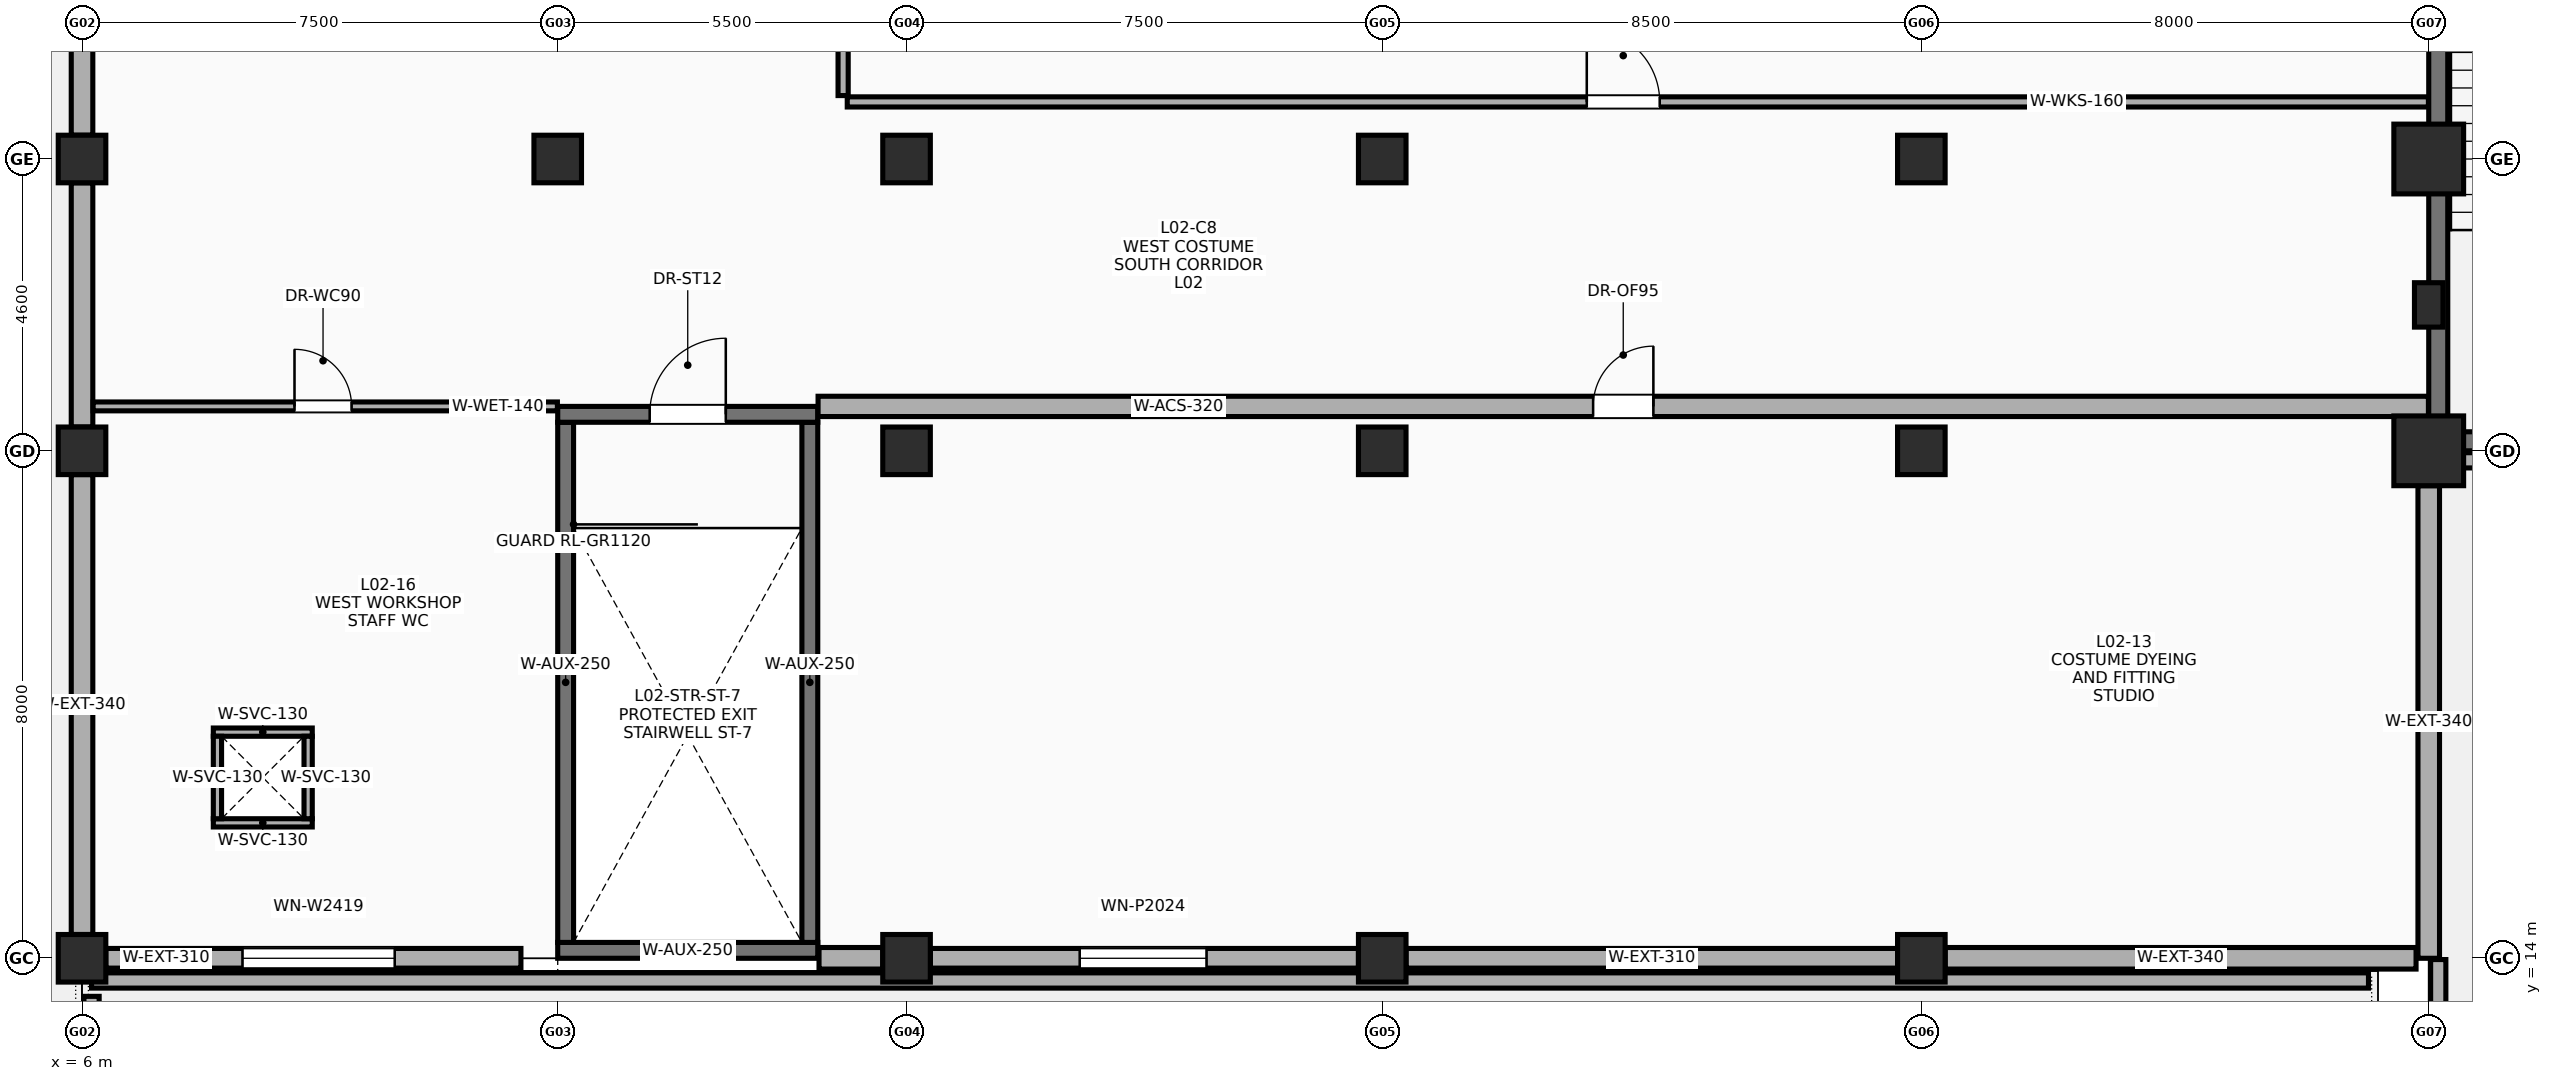
"""IFC4 building model, lengths in metres.
Left out: names, types, materials, properties, quantities, classifications, styles, units other than length and angle.
Written with IfcOpenShell. Run it as: python <this file> out.ifc"""

import sys

from ifc_helpers import new_model, si_unit, direction, frame, frame_2d, origin, origin_2d, place, context, subcontext, project, spatial, rectangle, extrude, element, fill, save


model = new_model("IFC4")
c1 = context("Model", 3, precision=1e-05, world=origin(), true_north=direction((0.0, 1.0)))
c2 = subcontext(c1, "Body", "Model", "MODEL_VIEW")
j1 = project(units=[si_unit("LENGTHUNIT", "METRE"), si_unit("PLANEANGLEUNIT", "RADIAN")], contexts=[c1])
p1 = place(None, origin())
s1 = spatial("IfcSite", under=j1, at=p1, CompositionType="ELEMENT")
p2 = place(p1, origin())
s2 = spatial("IfcBuilding", under=s1, at=p2, CompositionType="ELEMENT")
p3 = place(p2, frame((0.0, 0.0, 9.8)))
s3 = spatial("IfcBuildingStorey", under=s2, at=p3, CompositionType="ELEMENT", Elevation=9.8)
for number, where, z_axis, x_axis in (
    (1, (6.0, 14.0, 0.0), (0.0, 0.0, 1.0), (1.0, 0.0, 0.0)),
    (2, (6.0, 22.0, 0.0), (0.0, 0.0, 1.0), (1.0, 0.0, 0.0)),
    (3, (6.0, 26.6, 0.0), (0.0, 0.0, 1.0), (1.0, 0.0, 0.0)),
    (4, (13.5, 26.6, 0.0), (0.0, 0.0, 1.0), (1.0, 0.0, 0.0)),
    (5, (19.0, 14.0, 0.0), (0.0, 0.0, 1.0), (1.0, 0.0, 0.0)),
    (6, (19.0, 22.0, 0.0), (0.0, 0.0, 1.0), (1.0, 0.0, 0.0)),
    (7, (19.0, 26.6, 0.0), (0.0, 0.0, 1.0), (1.0, 0.0, 0.0)),
    (8, (26.5, 14.0, 0.0), (0.0, 0.0, 1.0), (1.0, 0.0, 0.0)),
    (9, (26.5, 22.0, 0.0), (0.0, 0.0, 1.0), (1.0, 0.0, 0.0)),
    (10, (26.5, 26.6, 0.0), (0.0, 0.0, 1.0), (1.0, 0.0, 0.0)),
    (11, (35.0, 14.0, 0.0), (0.0, 0.0, 1.0), (1.0, 0.0, 0.0)),
    (12, (35.0, 22.0, 0.0), (0.0, 0.0, 1.0), (1.0, 0.0, 0.0)),
    (13, (35.0, 26.6, 0.0), (0.0, 0.0, 1.0), (1.0, 0.0, 0.0)),
):
    element("IfcColumn", number, at=place(p3, frame(where, z_axis=z_axis, x_axis=x_axis)), inside=s3, PredefinedType="COLUMN", context=c2, shape_type="SweptSolid", body=[
        extrude(rectangle(XDim=0.75, YDim=0.75, at=origin_2d()), origin(), (0.0, 0.0, 1.0), 4.4),
    ])
for number, where, z_axis, x_axis in (
    (14, (43.0, 22.0, 0.0), (0.0, 0.0, 1.0), (1.0, 0.0, 0.0)),
    (15, (43.0, 26.6, 0.0), (0.0, 0.0, 1.0), (1.0, 0.0, 0.0)),
):
    element("IfcColumn", number, at=place(p3, frame(where, z_axis=z_axis, x_axis=x_axis)), inside=s3, PredefinedType="COLUMN", context=c2, shape_type="SweptSolid", body=[
        extrude(rectangle(XDim=1.1, YDim=1.1, at=origin_2d()), origin(), (0.0, 0.0, 1.0), 4.4),
    ])
p4 = place(p3, frame((43.0, 24.3, 0.0), z_axis=(0.0, 0.0, 1.0), x_axis=(1.0, 0.0, 0.0)))
e16 = element("IfcColumn", 16, at=p4, inside=s3, PredefinedType="PILASTER", context=c2, shape_type="SweptSolid", body=[
    extrude(rectangle(XDim=0.45, YDim=0.7, at=origin_2d()), origin(), (0.0, 0.0, 1.0), 4.4),
])
p5 = place(p3, frame((43.0, 22.15, 0.0), z_axis=(0.0, 0.0, 1.0), x_axis=(1.0, 0.0, 0.0)))
e17 = element("IfcWall", 17, at=p5, inside=s3, PredefinedType="SHEAR", context=c2, shape_type="SweptSolid", body=[
    extrude(rectangle(XDim=7.5, YDim=0.3, at=frame_2d((3.75, 0.0))), origin(), (0.0, 0.0, 1.0), 4.4),
])
p6 = place(p3, frame((43.15, 22.3, 0.0), z_axis=(0.0, 0.0, 1.0), x_axis=(0.0, 1.0, 0.0)))
e18 = element("IfcWall", 18, at=p6, inside=s3, PredefinedType="SHEAR", context=c2, shape_type="SweptSolid", body=[
    extrude(rectangle(XDim=8.2, YDim=0.3, at=frame_2d((4.1, 0.0))), origin(), (0.0, 0.0, 1.0), 4.4),
])
p7 = place(p3, frame((6.375, 14.0, 0.0), z_axis=(0.0, 0.0, 1.0), x_axis=(1.0, 0.0, 0.0)))
e19 = element("IfcWall", 19, at=p7, inside=s3, PredefinedType="SOLIDWALL", context=c2, shape_type="SweptSolid", body=[
    extrude(rectangle(XDim=6.545, YDim=0.31, at=frame_2d((3.272, 0.0))), origin(), (0.0, 0.0, 1.0), 3.1),
])
p8 = place(p7, frame((2.155, 0.0, 0.9)))
e20 = element("IfcOpeningElement", 20, at=p8, cuts=e19, PredefinedType="OPENING", context=c2, shape_type="SweptSolid", body=[
    extrude(rectangle(XDim=2.4, YDim=1.9, at=frame_2d((1.2, 0.95))), frame((0.0, 0.165, 0.0), z_axis=(0.0, -1.0, 0.0), x_axis=(1.0, 0.0, 0.0)), (0.0, 0.0, 1.0), 0.33),
])
p9 = place(p3, frame((19.375, 14.0, 0.0), z_axis=(0.0, 0.0, 1.0), x_axis=(1.0, 0.0, 0.0)))
e21 = element("IfcWall", 21, at=p9, inside=s3, PredefinedType="SOLIDWALL", context=c2, shape_type="SweptSolid", body=[
    extrude(rectangle(XDim=6.75, YDim=0.31, at=frame_2d((3.375, 0.0))), origin(), (0.0, 0.0, 1.0), 3.15),
])
p10 = place(p9, frame((2.355, 0.0, 0.57)))
e22 = element("IfcOpeningElement", 22, at=p10, cuts=e21, PredefinedType="OPENING", context=c2, shape_type="SweptSolid", body=[
    extrude(rectangle(XDim=2.0, YDim=2.4, at=frame_2d((1.0, 1.2))), frame((0.0, 0.165, 0.0), z_axis=(0.0, -1.0, 0.0), x_axis=(1.0, 0.0, 0.0)), (0.0, 0.0, 1.0), 0.33),
])
p11 = place(p3, frame((26.875, 14.0, 0.0), z_axis=(0.0, 0.0, 1.0), x_axis=(1.0, 0.0, 0.0)))
e23 = element("IfcWall", 23, at=p11, inside=s3, PredefinedType="SOLIDWALL", context=c2, shape_type="SweptSolid", body=[
    extrude(rectangle(XDim=7.75, YDim=0.31, at=frame_2d((3.875, 0.0))), origin(), (0.0, 0.0, 1.0), 3.15),
])
p12 = place(p3, frame((43.0, 14.0, 0.0), z_axis=(0.0, 0.0, 1.0), x_axis=(0.0, 1.0, 0.0)))
e24 = element("IfcWall", 24, at=p12, inside=s3, PredefinedType="SOLIDWALL", context=c2, shape_type="SweptSolid", body=[
    extrude(rectangle(XDim=7.45, YDim=0.34, at=frame_2d((3.725, 0.0))), origin(), (0.0, 0.0, 1.0), 3.15),
])
p13 = place(p3, frame((35.375, 14.0, 0.0), z_axis=(0.0, 0.0, 1.0), x_axis=(1.0, 0.0, 0.0)))
e25 = element("IfcWall", 25, at=p13, inside=s3, PredefinedType="SOLIDWALL", context=c2, shape_type="SweptSolid", body=[
    extrude(rectangle(XDim=7.425, YDim=0.34, at=frame_2d((3.712, 0.0))), origin(), (0.0, 0.0, 1.0), 3.15),
])
p14 = place(p3, frame((6.0, 14.375, 0.0), z_axis=(0.0, 0.0, 1.0), x_axis=(0.0, 1.0, 0.0)))
e26 = element("IfcWall", 26, at=p14, inside=s3, PredefinedType="SOLIDWALL", context=c2, shape_type="SweptSolid", body=[
    extrude(rectangle(XDim=7.25, YDim=0.34, at=frame_2d((3.625, 0.0))), origin(), (0.0, 0.0, 1.0), 3.1),
])
p15 = place(p3, frame((6.0, 22.375, 0.0), z_axis=(0.0, 0.0, 1.0), x_axis=(0.0, 1.0, 0.0)))
e27 = element("IfcWall", 27, at=p15, inside=s3, PredefinedType="SOLIDWALL", context=c2, shape_type="SweptSolid", body=[
    extrude(rectangle(XDim=3.85, YDim=0.34, at=frame_2d((1.925, 0.0))), origin(), (0.0, 0.0, 1.0), 3.15),
])
p16 = place(p3, frame((6.0, 26.975, 0.0), z_axis=(0.0, 0.0, 1.0), x_axis=(0.0, 1.0, 0.0)))
e28 = element("IfcWall", 28, at=p16, inside=s3, PredefinedType="SOLIDWALL", context=c2, shape_type="SweptSolid", body=[
    extrude(rectangle(XDim=3.85, YDim=0.34, at=frame_2d((1.925, 0.0))), origin(), (0.0, 0.0, 1.0), 3.15),
])
p17 = place(p3, frame((43.15, 21.85, 0.0), z_axis=(0.0, 0.0, 1.0), x_axis=(1.0, 0.0, 0.0)))
e29 = element("IfcWall", 29, at=p17, inside=s3, PredefinedType="PARAPET", context=c2, shape_type="SweptSolid", body=[
    extrude(rectangle(XDim=7.2, YDim=0.24, at=frame_2d((3.6, 0.0))), origin(), (0.0, 0.0, 1.0), 0.65),
])
p18 = place(p3, frame((6.15, 13.65, 0.0), z_axis=(0.0, 0.0, 1.0), x_axis=(1.0, 0.0, 0.0)))
e30 = element("IfcWall", 30, at=p18, inside=s3, PredefinedType="PARAPET", context=c2, shape_type="SweptSolid", body=[
    extrude(rectangle(XDim=35.9, YDim=0.24, at=frame_2d((17.95, 0.0))), origin(), (0.0, 0.0, 1.0), 0.65),
])
p19 = place(p3, frame((6.15, 6.4, 0.0), z_axis=(0.0, 0.0, 1.0), x_axis=(0.0, 1.0, 0.0)))
e31 = element("IfcWall", 31, at=p19, inside=s3, PredefinedType="PARAPET", context=c2, shape_type="SweptSolid", body=[
    extrude(rectangle(XDim=7.0, YDim=0.24, at=frame_2d((3.5, 0.0))), origin(), (0.0, 0.0, 1.0), 0.65),
])
p20 = place(p3, frame((13.5, 14.125, 0.0), z_axis=(0.0, 0.0, 1.0), x_axis=(1.0, 0.0, 0.0)))
e32 = element("IfcWall", 32, at=p20, inside=s3, PredefinedType="SHEAR", context=c2, shape_type="SweptSolid", body=[
    extrude(rectangle(XDim=4.1, YDim=0.25, at=frame_2d((2.05, 0.0))), origin(), (0.0, 0.0, 1.0), 4.4),
])
for number, where, z_axis, x_axis in (
    (33, (13.625, 14.25, 0.0), (0.0, 0.0, 1.0), (0.0, 1.0, 0.0)),
    (34, (17.475, 14.25, 0.0), (0.0, 0.0, 1.0), (0.0, 1.0, 0.0)),
):
    element("IfcWall", number, at=place(p3, frame(where, z_axis=z_axis, x_axis=x_axis)), inside=s3, PredefinedType="SHEAR", context=c2, shape_type="SweptSolid", body=[
        extrude(rectangle(XDim=8.2, YDim=0.25, at=frame_2d((4.1, 0.0))), origin(), (0.0, 0.0, 1.0), 4.4),
    ])
p21 = place(p3, frame((13.5, 22.575, 0.0), z_axis=(0.0, 0.0, 1.0), x_axis=(1.0, 0.0, 0.0)))
e35 = element("IfcWall", 35, at=p21, inside=s3, PredefinedType="SHEAR", context=c2, shape_type="SweptSolid", body=[
    extrude(rectangle(XDim=4.1, YDim=0.25, at=frame_2d((2.05, 0.0))), origin(), (0.0, 0.0, 1.0), 4.4),
])
p22 = place(p21, frame((1.45, 0.0, 0.0)))
e36 = element("IfcOpeningElement", 36, at=p22, cuts=e35, PredefinedType="OPENING", context=c2, shape_type="SweptSolid", body=[
    extrude(rectangle(XDim=1.2, YDim=2.15, at=frame_2d((0.6, 1.075))), frame((0.0, 0.135, 0.0), z_axis=(0.0, -1.0, 0.0), x_axis=(1.0, 0.0, 0.0)), (0.0, 0.0, 1.0), 0.27),
])
for number, where, z_axis, x_axis in (
    (37, (8.07, 16.135, 0.0), (0.0, 0.0, 1.0), (1.0, 0.0, 0.0)),
    (38, (8.07, 17.565, 0.0), (0.0, 0.0, 1.0), (1.0, 0.0, 0.0)),
):
    element("IfcWall", number, at=place(p3, frame(where, z_axis=z_axis, x_axis=x_axis)), inside=s3, PredefinedType="PARTITIONING", context=c2, shape_type="SweptSolid", body=[
        extrude(rectangle(XDim=1.56, YDim=0.13, at=frame_2d((0.78, 0.0))), origin(), (0.0, 0.0, 1.0), 4.1),
    ])
for number, where, z_axis, x_axis in (
    (39, (8.135, 16.2, 0.0), (0.0, 0.0, 1.0), (0.0, 1.0, 0.0)),
    (40, (9.565, 16.2, 0.0), (0.0, 0.0, 1.0), (0.0, 1.0, 0.0)),
):
    element("IfcWall", number, at=place(p3, frame(where, z_axis=z_axis, x_axis=x_axis)), inside=s3, PredefinedType="PARTITIONING", context=c2, shape_type="SweptSolid", body=[
        extrude(rectangle(XDim=1.3, YDim=0.13, at=frame_2d((0.65, 0.0))), origin(), (0.0, 0.0, 1.0), 4.1),
    ])
p23 = place(p3, frame((17.605, 22.7, 0.0), z_axis=(0.0, 0.0, 1.0), x_axis=(1.0, 0.0, 0.0)))
e41 = element("IfcWall", 41, at=p23, inside=s3, PredefinedType="PARTITIONING", context=c2, shape_type="SweptSolid", body=[
    extrude(rectangle(XDim=25.39, YDim=0.32, at=frame_2d((12.695, 0.0))), origin(), (0.0, 0.0, 1.0), 3.5),
])
p24 = place(p23, frame((12.22, 0.0, 0.0)))
e42 = element("IfcOpeningElement", 42, at=p24, cuts=e41, PredefinedType="OPENING", context=c2, shape_type="SweptSolid", body=[
    extrude(rectangle(XDim=0.95, YDim=2.15, at=frame_2d((0.475, 1.075))), frame((0.0, 0.17, 0.0), z_axis=(0.0, -1.0, 0.0), x_axis=(1.0, 0.0, 0.0)), (0.0, 0.0, 1.0), 0.34),
])
p25 = place(p3, frame((18.065, 27.5, 0.0), z_axis=(0.0, 0.0, 1.0), x_axis=(1.0, 0.0, 0.0)))
e43 = element("IfcWall", 43, at=p25, inside=s3, PredefinedType="PARTITIONING", context=c2, shape_type="SweptSolid", body=[
    extrude(rectangle(XDim=24.93, YDim=0.16, at=frame_2d((12.465, 0.0))), origin(), (0.0, 0.0, 1.0), 3.5),
])
p26 = place(p25, frame((11.66, 0.0, 0.0)))
e44 = element("IfcOpeningElement", 44, at=p26, cuts=e43, PredefinedType="OPENING", context=c2, shape_type="SweptSolid", body=[
    extrude(rectangle(XDim=1.15, YDim=2.18, at=frame_2d((0.575, 1.09))), frame((0.0, 0.09, 0.0), z_axis=(0.0, -1.0, 0.0), x_axis=(1.0, 0.0, 0.0)), (0.0, 0.0, 1.0), 0.18),
])
p27 = place(p3, frame((6.175, 22.7, 0.0), z_axis=(0.0, 0.0, 1.0), x_axis=(1.0, 0.0, 0.0)))
e45 = element("IfcWall", 45, at=p27, inside=s3, PredefinedType="PARTITIONING", context=c2, shape_type="SweptSolid", body=[
    extrude(rectangle(XDim=7.32, YDim=0.14, at=frame_2d((3.66, 0.0))), origin(), (0.0, 0.0, 1.0), 3.5),
])
p28 = place(p27, frame((3.175, 0.0, 0.0)))
e46 = element("IfcOpeningElement", 46, at=p28, cuts=e45, PredefinedType="OPENING", context=c2, shape_type="SweptSolid", body=[
    extrude(rectangle(XDim=0.9, YDim=2.1, at=frame_2d((0.45, 1.05))), frame((0.0, 0.08, 0.0), z_axis=(0.0, -1.0, 0.0), x_axis=(1.0, 0.0, 0.0)), (0.0, 0.0, 1.0), 0.16),
])
p29 = place(p3, frame((18.0, 27.6, 0.0), z_axis=(0.0, 0.0, 1.0), x_axis=(0.0, 1.0, 0.0)))
e47 = element("IfcWall", 47, at=p29, inside=s3, PredefinedType="PARTITIONING", context=c2, shape_type="SweptSolid", body=[
    extrude(rectangle(XDim=3.4, YDim=0.16, at=frame_2d((1.7, 0.0))), origin(), (0.0, 0.0, 1.0), 3.5),
])
p30 = place(p3, frame((17.62, 14.0, 0.0), z_axis=(0.0, 0.0, 1.0), x_axis=(1.0, 0.0, 0.0)))
e48 = element("IfcWall", 48, at=p30, inside=s3, PredefinedType="SOLIDWALL", context=c2, shape_type="SweptSolid", body=[
    extrude(rectangle(XDim=1.005, YDim=0.34, at=frame_2d((0.502, 0.0))), origin(), (0.0, 0.0, 1.0), 3.1),
])
p31 = place(p3, frame((43.15, 6.4, 0.0), z_axis=(0.0, 0.0, 1.0), x_axis=(0.0, 1.0, 0.0)))
e49 = element("IfcWall", 49, at=p31, inside=s3, PredefinedType="PARAPET", context=c2, shape_type="SweptSolid", body=[
    extrude(rectangle(XDim=7.58, YDim=0.24, at=frame_2d((3.79, 0.0))), origin(), (0.0, 0.0, 1.0), 0.65),
])
p32 = place(p8, origin())
e50 = element("IfcWindow", 50, at=p32, inside=s3, PartitioningType="SINGLE_PANEL", PredefinedType="WINDOW", context=c2, shape_type="SweptSolid", body=[
    extrude(rectangle(XDim=2.4, YDim=1.9, at=frame_2d((1.2, 0.95))), frame((0.0, 0.03, 0.0), z_axis=(0.0, -1.0, 0.0), x_axis=(1.0, 0.0, 0.0)), (0.0, 0.0, 1.0), 0.06),
])
fill(e20, e50)
p33 = place(p10, origin())
e51 = element("IfcWindow", 51, at=p33, inside=s3, PartitioningType="SINGLE_PANEL", PredefinedType="WINDOW", context=c2, shape_type="SweptSolid", body=[
    extrude(rectangle(XDim=2.0, YDim=2.4, at=frame_2d((1.0, 1.2))), frame((0.0, 0.03, 0.0), z_axis=(0.0, -1.0, 0.0), x_axis=(1.0, 0.0, 0.0)), (0.0, 0.0, 1.0), 0.06),
])
fill(e22, e51)
p34 = place(p22, origin())
e52 = element("IfcDoor", 52, at=p34, inside=s3, OperationType="SINGLE_SWING_RIGHT", PredefinedType="DOOR", context=c2, shape_type="SweptSolid", body=[
    extrude(rectangle(XDim=1.2, YDim=2.15, at=frame_2d((0.6, 1.075))), frame((0.0, 0.025, 0.0), z_axis=(0.0, -1.0, 0.0), x_axis=(1.0, 0.0, 0.0)), (0.0, 0.0, 1.0), 0.05),
])
fill(e36, e52)
p35 = place(p24, origin())
e53 = element("IfcDoor", 53, at=p35, inside=s3, OperationType="SINGLE_SWING_RIGHT", PredefinedType="DOOR", context=c2, shape_type="SweptSolid", body=[
    extrude(rectangle(XDim=0.95, YDim=2.15, at=frame_2d((0.475, 1.075))), frame((0.0, 0.025, 0.0), z_axis=(0.0, -1.0, 0.0), x_axis=(1.0, 0.0, 0.0)), (0.0, 0.0, 1.0), 0.05),
])
fill(e42, e53)
p36 = place(p26, origin())
e54 = element("IfcDoor", 54, at=p36, inside=s3, OperationType="SINGLE_SWING_LEFT", PredefinedType="DOOR", context=c2, shape_type="SweptSolid", body=[
    extrude(rectangle(XDim=1.15, YDim=2.18, at=frame_2d((0.575, 1.09))), frame((0.0, 0.025, 0.0), z_axis=(0.0, -1.0, 0.0), x_axis=(1.0, 0.0, 0.0)), (0.0, 0.0, 1.0), 0.05),
])
fill(e44, e54)
p37 = place(p28, origin())
e55 = element("IfcDoor", 55, at=p37, inside=s3, OperationType="SINGLE_SWING_LEFT", PredefinedType="DOOR", context=c2, shape_type="SweptSolid", body=[
    extrude(rectangle(XDim=0.9, YDim=2.1, at=frame_2d((0.45, 1.05))), frame((0.0, 0.025, 0.0), z_axis=(0.0, -1.0, 0.0), x_axis=(1.0, 0.0, 0.0)), (0.0, 0.0, 1.0), 0.05),
])
fill(e46, e55)
save(model, sys.argv[1])
